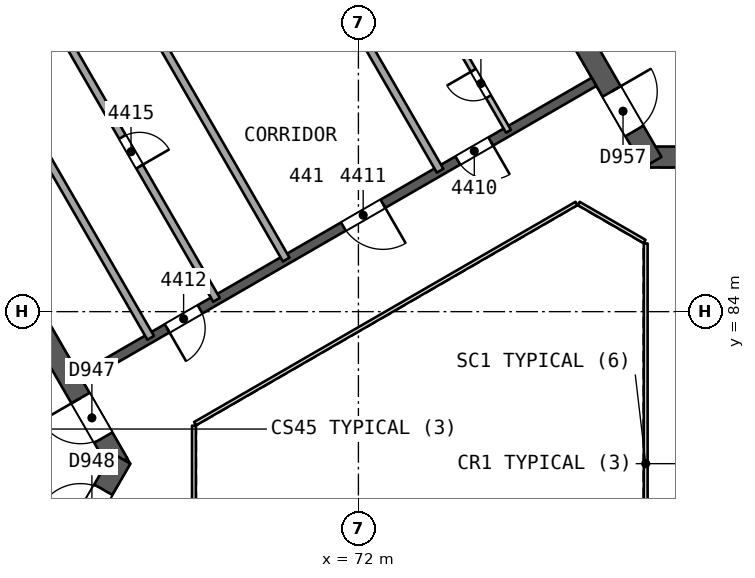
"""IFC4 building model, lengths in metres.
Left out: names, types, materials, properties, quantities, classifications, styles, units other than length and angle.
Written with IfcOpenShell. Run it as: python <this file> out.ifc"""

import sys

from ifc_helpers import new_model, si_unit, direction, frame, frame_2d, origin, place, context, subcontext, project, spatial, rectangle, extrude, element, fill, save


model = new_model("IFC4")
c1 = context("Model", 3, precision=1e-05, world=origin(), true_north=direction((0.0, 1.0)))
c2 = subcontext(c1, "Body", "Model", "MODEL_VIEW")
j1 = project(units=[si_unit("LENGTHUNIT", "METRE"), si_unit("PLANEANGLEUNIT", "RADIAN")], contexts=[c1])
p1 = place(None, origin())
s1 = spatial("IfcSite", under=j1, at=p1, CompositionType="ELEMENT")
p2 = place(p1, origin())
s2 = spatial("IfcBuilding", under=s1, at=p2, CompositionType="ELEMENT")
p3 = place(p2, frame((0.0, 0.0, 182.2)))
s3 = spatial("IfcBuildingStorey", under=s2, at=p3, CompositionType="ELEMENT", Elevation=182.2)
p4 = place(p3, frame((65.682, 80.0, 0.0), z_axis=(0.0, 0.0, 1.0), x_axis=(-0.500000202252, 0.866025287014, 0.0)))
e1 = element("IfcWall", 1, at=p4, inside=s3, PredefinedType="SHEAR", context=c2, shape_type="SweptSolid", body=[
    extrude(rectangle(XDim=10.221, YDim=0.55, at=frame_2d((5.111, 0.0))), origin(), (0.0, 0.0, 1.0), 3.7),
])
p5 = place(p4, frame((0.791, 0.0, 0.0)))
e2 = element("IfcOpeningElement", 2, at=p5, cuts=e1, PredefinedType="OPENING", context=c2, shape_type="SweptSolid", body=[
    extrude(rectangle(XDim=1.2, YDim=2.1, at=frame_2d((0.6, 1.05))), frame((0.0, 0.286, 0.0), z_axis=(0.0, -1.0, 0.0), x_axis=(1.0, 0.0, 0.0)), (0.0, 0.0, 1.0), 0.571),
])
p6 = place(p3, frame((60.709, 71.386, 0.0), z_axis=(0.0, 0.0, 1.0), x_axis=(0.500015938302, 0.866016201606, 0.0)))
e3 = element("IfcWall", 3, at=p6, inside=s3, PredefinedType="SHEAR", context=c2, shape_type="SweptSolid", body=[
    extrude(rectangle(XDim=10.105, YDim=0.55, at=frame_2d((5.053, 0.0))), origin(), (0.0, 0.0, 1.0), 3.7),
])
p7 = place(p6, frame((7.955, 0.0, 0.0)))
e4 = element("IfcOpeningElement", 4, at=p7, cuts=e3, PredefinedType="OPENING", context=c2, shape_type="SweptSolid", body=[
    extrude(rectangle(XDim=1.2, YDim=2.1, at=frame_2d((0.6, 1.05))), frame((0.0, 0.286, 0.0), z_axis=(0.0, -1.0, 0.0), x_axis=(1.0, 0.0, 0.0)), (0.0, 0.0, 1.0), 0.571),
])
p8 = place(p3, frame((79.659, 88.069, 0.0), z_axis=(0.0, 0.0, 1.0), x_axis=(1.0, 0.0, 0.0)))
e5 = element("IfcWall", 5, at=p8, inside=s3, PredefinedType="SHEAR", context=c2, shape_type="SweptSolid", body=[
    extrude(rectangle(XDim=10.221, YDim=0.55, at=frame_2d((5.111, 0.0))), origin(), (0.0, 0.0, 1.0), 3.7),
])
p9 = place(p8, frame((0.791, 0.0, 0.0)))
e6 = element("IfcOpeningElement", 6, at=p9, cuts=e5, PredefinedType="OPENING", context=c2, shape_type="SweptSolid", body=[
    extrude(rectangle(XDim=1.2, YDim=2.1, at=frame_2d((0.6, 1.05))), frame((0.0, 0.286, 0.0), z_axis=(0.0, -1.0, 0.0), x_axis=(1.0, 0.0, 0.0)), (0.0, 0.0, 1.0), 0.571),
])
p10 = place(p3, frame((74.686, 96.683, 0.0), z_axis=(0.0, 0.0, 1.0), x_axis=(0.499997818338, -0.866026663364, 0.0)))
e7 = element("IfcWall", 7, at=p10, inside=s3, PredefinedType="SHEAR", context=c2, shape_type="SweptSolid", body=[
    extrude(rectangle(XDim=10.105, YDim=0.55, at=frame_2d((5.052, 0.0))), origin(), (0.0, 0.0, 1.0), 3.7),
])
p11 = place(p10, frame((7.955, 0.0, 0.0)))
e8 = element("IfcOpeningElement", 8, at=p11, cuts=e7, PredefinedType="OPENING", context=c2, shape_type="SweptSolid", body=[
    extrude(rectangle(XDim=1.2, YDim=2.1, at=frame_2d((0.6, 1.05))), frame((0.0, 0.286, 0.0), z_axis=(0.0, -1.0, 0.0), x_axis=(1.0, 0.0, 0.0)), (0.0, 0.0, 1.0), 0.571),
])
p12 = place(p3, frame((78.2, 90.046, 0.0), z_axis=(0.0, 0.0, 1.0), x_axis=(-0.866026492143, -0.499998114903, 0.0)))
e9 = element("IfcWall", 9, at=p12, inside=s3, PredefinedType="SHEAR", context=c2, shape_type="SweptSolid", body=[
    extrude(rectangle(XDim=15.588, YDim=0.25, at=frame_2d((7.794, 0.0))), origin(), (0.0, 0.0, 1.0), 3.25),
])
p13 = place(p12, frame((3.138, 0.0, 0.0)))
e10 = element("IfcOpeningElement", 10, at=p13, cuts=e9, PredefinedType="OPENING", context=c2, shape_type="SweptSolid", body=[
    extrude(rectangle(XDim=1.0, YDim=2.1, at=frame_2d((0.5, 1.05))), frame((0.0, 0.135, 0.0), z_axis=(0.0, -1.0, 0.0), x_axis=(1.0, 0.0, 0.0)), (0.0, 0.0, 1.0), 0.271),
])
p14 = place(p12, frame((6.415, 0.0, 0.0)))
e11 = element("IfcOpeningElement", 11, at=p14, cuts=e9, PredefinedType="OPENING", context=c2, shape_type="SweptSolid", body=[
    extrude(rectangle(XDim=1.2, YDim=2.4, at=frame_2d((0.6, 1.2))), frame((0.0, 0.135, 0.0), z_axis=(0.0, -1.0, 0.0), x_axis=(1.0, 0.0, 0.0)), (0.0, 0.0, 1.0), 0.271),
])
p15 = place(p12, frame((11.971, 0.0, 0.0)))
e12 = element("IfcOpeningElement", 12, at=p15, cuts=e9, PredefinedType="OPENING", context=c2, shape_type="SweptSolid", body=[
    extrude(rectangle(XDim=1.0, YDim=2.1, at=frame_2d((0.5, 1.05))), frame((0.0, 0.135, 0.0), z_axis=(0.0, -1.0, 0.0), x_axis=(1.0, 0.0, 0.0)), (0.0, 0.0, 1.0), 0.271),
])
p16 = place(p3, frame((75.948, 88.746, 0.0), z_axis=(0.0, 0.0, 1.0), x_axis=(-0.499987231761, 0.866032775405, 0.0)))
e13 = element("IfcWall", 13, at=p16, inside=s3, PredefinedType="PARTITIONING", context=c2, shape_type="SweptSolid", body=[
    extrude(rectangle(XDim=2.9, YDim=0.15, at=frame_2d((1.45, 0.0))), origin(), (0.0, 0.0, 1.0), 3.25),
])
p17 = place(p16, frame((1.05, 0.0, 0.0)))
e14 = element("IfcOpeningElement", 14, at=p17, cuts=e13, PredefinedType="OPENING", context=c2, shape_type="SweptSolid", body=[
    extrude(rectangle(XDim=0.8, YDim=2.1, at=frame_2d((0.4, 1.05))), frame((0.0, 0.085, 0.0), z_axis=(0.0, -1.0, 0.0), x_axis=(1.0, 0.0, 0.0)), (0.0, 0.0, 1.0), 0.171),
])
for number, where, z_axis, x_axis in (
    (15, (68.561, 97.388, 0.0), (0.0, 0.0, 1.0), (0.5, -0.866, 0.0)),
    (16, (64.511, 95.05, 0.0), (0.0, 0.0, 1.0), (0.5, -0.866, 0.0)),
):
    element("IfcWall", number, at=place(p3, frame(where, z_axis=z_axis, x_axis=x_axis)), inside=s3, PredefinedType="PARTITIONING", context=c2, shape_type="SweptSolid", body=[
        extrude(rectangle(XDim=11.178, YDim=0.2, at=frame_2d((5.589, 0.0))), origin(), (0.0, 0.0, 1.0), 3.25),
    ])
p18 = place(p3, frame((66.534, 83.311, 0.0), z_axis=(0.0, 0.0, 1.0), x_axis=(-0.5000018851, 0.866024315419, 0.0)))
e17 = element("IfcWall", 17, at=p18, inside=s3, PredefinedType="PARTITIONING", context=c2, shape_type="SweptSolid", body=[
    extrude(rectangle(XDim=9.0, YDim=0.2, at=frame_2d((4.5, 0.0))), origin(), (0.0, 0.0, 1.0), 3.25),
])
p19 = place(p3, frame((63.766, 92.105, 0.0), z_axis=(0.0, 0.0, 1.0), x_axis=(0.5000018851, -0.866024315419, 0.0)))
e18 = element("IfcWall", 18, at=p19, inside=s3, PredefinedType="PARTITIONING", context=c2, shape_type="SweptSolid", body=[
    extrude(rectangle(XDim=9.0, YDim=0.2, at=frame_2d((4.5, 0.0))), origin(), (0.0, 0.0, 1.0), 3.25),
])
p20 = place(p19, frame((4.05, 0.0, 0.0)))
e19 = element("IfcOpeningElement", 19, at=p20, cuts=e18, PredefinedType="OPENING", context=c2, shape_type="SweptSolid", body=[
    extrude(rectangle(XDim=0.9, YDim=2.1, at=frame_2d((0.45, 1.05))), frame((0.0, 0.11, 0.0), z_axis=(0.0, -1.0, 0.0), x_axis=(1.0, 0.0, 0.0)), (0.0, 0.0, 1.0), 0.221),
])
p21 = place(p3, frame((42.841, 82.711, 0.0), z_axis=(0.0, 0.0, 1.0), x_axis=(0.866024774967, 0.500001089142, 0.0)))
e20 = element("IfcWall", 20, at=p21, inside=s3, PredefinedType="SOLIDWALL", context=c2, shape_type="SweptSolid", body=[
    extrude(rectangle(XDim=52.991, YDim=0.3, at=frame_2d((26.496, 0.0))), origin(), (0.0, 0.0, 1.0), 3.25),
])
p22 = place(p21, frame((20.619, 0.0, 0.0)))
e21 = element("IfcOpeningElement", 21, at=p22, cuts=e20, PredefinedType="OPENING", context=c2, shape_type="SweptSolid", body=[
    extrude(rectangle(XDim=2.4, YDim=2.4, at=frame_2d((1.2, 1.2))), frame((0.0, 0.161, 0.0), z_axis=(0.0, -1.0, 0.0), x_axis=(1.0, 0.0, 0.0)), (0.0, 0.0, 1.0), 0.321),
])
p23 = place(p21, frame((9.392, 0.0, 0.0)))
e22 = element("IfcOpeningElement", 22, at=p23, cuts=e20, PredefinedType="OPENING", context=c2, shape_type="SweptSolid", body=[
    extrude(rectangle(XDim=2.4, YDim=2.4, at=frame_2d((1.2, 1.2))), frame((0.0, 0.161, 0.0), z_axis=(0.0, -1.0, 0.0), x_axis=(1.0, 0.0, 0.0)), (0.0, 0.0, 1.0), 0.321),
])
p24 = place(p21, frame((40.145, 0.0, 0.0)))
e23 = element("IfcOpeningElement", 23, at=p24, cuts=e20, PredefinedType="OPENING", context=c2, shape_type="SweptSolid", body=[
    extrude(rectangle(XDim=2.4, YDim=2.4, at=frame_2d((1.2, 1.2))), frame((0.0, 0.161, 0.0), z_axis=(0.0, -1.0, 0.0), x_axis=(1.0, 0.0, 0.0)), (0.0, 0.0, 1.0), 0.321),
])
p25 = place(p21, frame((26.375, 0.0, 0.9)))
e24 = element("IfcOpeningElement", 24, at=p25, cuts=e20, PredefinedType="OPENING", context=c2, shape_type="SweptSolid", body=[
    extrude(rectangle(XDim=1.8, YDim=1.5, at=frame_2d((0.9, 0.75))), frame((0.0, 0.161, 0.0), z_axis=(0.0, -1.0, 0.0), x_axis=(1.0, 0.0, 0.0)), (0.0, 0.0, 1.0), 0.321),
])
p26 = place(p3, frame((86.77, 89.486, 0.0), z_axis=(0.0, 0.0, 1.0), x_axis=(-0.86601811187, 0.500012629753, 0.0)))
e25 = element("IfcWall", 25, at=p26, inside=s3, PredefinedType="SOLIDWALL", context=c2, shape_type="SweptSolid", body=[
    extrude(rectangle(XDim=10.9, YDim=0.2, at=frame_2d((5.45, 0.0))), origin(), (0.0, 0.0, 1.0), 3.25),
])
p27 = place(p26, frame((0.575, 0.0, 0.0)))
e26 = element("IfcOpeningElement", 26, at=p27, cuts=e25, PredefinedType="OPENING", context=c2, shape_type="SweptSolid", body=[
    extrude(rectangle(XDim=1.1, YDim=2.1, at=frame_2d((0.55, 1.05))), frame((0.0, 0.11, 0.0), z_axis=(0.0, -1.0, 0.0), x_axis=(1.0, 0.0, 0.0)), (0.0, 0.0, 1.0), 0.221),
])
p28 = place(p26, frame((2.825, 0.0, 0.0)))
e27 = element("IfcOpeningElement", 27, at=p28, cuts=e25, PredefinedType="OPENING", context=c2, shape_type="SweptSolid", body=[
    extrude(rectangle(XDim=1.1, YDim=2.1, at=frame_2d((0.55, 1.05))), frame((0.0, 0.11, 0.0), z_axis=(0.0, -1.0, 0.0), x_axis=(1.0, 0.0, 0.0)), (0.0, 0.0, 1.0), 0.221),
])
p29 = place(p26, frame((5.075, 0.0, 0.0)))
e28 = element("IfcOpeningElement", 28, at=p29, cuts=e25, PredefinedType="OPENING", context=c2, shape_type="SweptSolid", body=[
    extrude(rectangle(XDim=1.1, YDim=2.1, at=frame_2d((0.55, 1.05))), frame((0.0, 0.11, 0.0), z_axis=(0.0, -1.0, 0.0), x_axis=(1.0, 0.0, 0.0)), (0.0, 0.0, 1.0), 0.221),
])
p30 = place(p26, frame((7.325, 0.0, 0.0)))
e29 = element("IfcOpeningElement", 29, at=p30, cuts=e25, PredefinedType="OPENING", context=c2, shape_type="SweptSolid", body=[
    extrude(rectangle(XDim=1.1, YDim=2.1, at=frame_2d((0.55, 1.05))), frame((0.0, 0.11, 0.0), z_axis=(0.0, -1.0, 0.0), x_axis=(1.0, 0.0, 0.0)), (0.0, 0.0, 1.0), 0.221),
])
p31 = place(p3, frame((89.33, 90.872, 0.0), z_axis=(0.0, 0.0, 1.0), x_axis=(-0.866027589512, 0.49999621419, 0.0)))
e30 = element("IfcWall", 30, at=p31, inside=s3, PredefinedType="SOLIDWALL", context=c2, shape_type="SweptSolid", body=[
    extrude(rectangle(XDim=10.524, YDim=0.2, at=frame_2d((5.262, 0.0))), origin(), (0.0, 0.0, 1.0), 3.25),
])
p32 = place(p31, frame((0.312, 0.0, 0.0)))
e31 = element("IfcOpeningElement", 31, at=p32, cuts=e30, PredefinedType="OPENING", context=c2, shape_type="SweptSolid", body=[
    extrude(rectangle(XDim=0.9, YDim=2.1, at=frame_2d((0.45, 1.05))), frame((0.0, 0.11, 0.0), z_axis=(0.0, -1.0, 0.0), x_axis=(1.0, 0.0, 0.0)), (0.0, 0.0, 1.0), 0.221),
])
p33 = place(p3, frame((79.56, 74.206, 0.0), z_axis=(0.0, 0.0, 1.0), x_axis=(0.0, 1.0, 0.0)))
e32 = element("IfcWall", 32, at=p33, inside=s3, PredefinedType="PARTITIONING", context=c2, shape_type="SweptSolid", body=[
    extrude(rectangle(XDim=11.588, YDim=0.1, at=frame_2d((5.794, 0.0))), origin(), (0.0, 0.0, 1.0), 3.25),
])
p34 = place(p3, frame((79.53, 85.846, 0.0), z_axis=(0.0, 0.0, 1.0), x_axis=(-0.866041268327, 0.499972520799, 0.0)))
e33 = element("IfcWall", 33, at=p34, inside=s3, PredefinedType="PARTITIONING", context=c2, shape_type="SweptSolid", body=[
    extrude(rectangle(XDim=2.0, YDim=0.1, at=frame_2d((1.0, 0.0))), origin(), (0.0, 0.0, 1.0), 3.25),
])
p35 = place(p3, frame((77.738, 86.846, 0.0), z_axis=(0.0, 0.0, 1.0), x_axis=(-0.866026658274, -0.499997827154, 0.0)))
e34 = element("IfcWall", 34, at=p35, inside=s3, PredefinedType="PARTITIONING", context=c2, shape_type="SweptSolid", body=[
    extrude(rectangle(XDim=11.588, YDim=0.1, at=frame_2d((5.794, 0.0))), origin(), (0.0, 0.0, 1.0), 3.25),
])
p36 = place(p3, frame((67.672, 81.0, 0.0), z_axis=(0.0, 0.0, 1.0), x_axis=(0.0, -1.0, 0.0)))
e35 = element("IfcWall", 35, at=p36, inside=s3, PredefinedType="PARTITIONING", context=c2, shape_type="SweptSolid", body=[
    extrude(rectangle(XDim=2.0, YDim=0.1, at=frame_2d((1.0, 0.0))), origin(), (0.0, 0.0, 1.0), 3.25),
])
p37 = place(p17, origin())
e36 = element("IfcDoor", 36, at=p37, inside=s3, OperationType="SINGLE_SWING_RIGHT", PredefinedType="NOTDEFINED", context=c2, shape_type="SweptSolid", body=[
    extrude(rectangle(XDim=0.8, YDim=2.1, at=frame_2d((0.4, 1.05))), frame((0.0, 0.025, 0.0), z_axis=(0.0, -1.0, 0.0), x_axis=(1.0, 0.0, 0.0)), (0.0, 0.0, 1.0), 0.05),
])
fill(e14, e36)
p38 = place(p13, origin())
e37 = element("IfcDoor", 37, at=p38, inside=s3, OperationType="SINGLE_SWING_LEFT", PredefinedType="NOTDEFINED", context=c2, shape_type="SweptSolid", body=[
    extrude(rectangle(XDim=1.0, YDim=2.1, at=frame_2d((0.5, 1.05))), frame((0.0, 0.025, 0.0), z_axis=(0.0, -1.0, 0.0), x_axis=(1.0, 0.0, 0.0)), (0.0, 0.0, 1.0), 0.05),
])
fill(e10, e37)
p39 = place(p14, origin())
e38 = element("IfcDoor", 38, at=p39, inside=s3, OperationType="SINGLE_SWING_LEFT", PredefinedType="NOTDEFINED", context=c2, shape_type="SweptSolid", body=[
    extrude(rectangle(XDim=1.2, YDim=2.4, at=frame_2d((0.6, 1.2))), frame((0.0, 0.025, 0.0), z_axis=(0.0, -1.0, 0.0), x_axis=(1.0, 0.0, 0.0)), (0.0, 0.0, 1.0), 0.05),
])
fill(e11, e38)
p40 = place(p15, origin())
e39 = element("IfcDoor", 39, at=p40, inside=s3, OperationType="SINGLE_SWING_RIGHT", PredefinedType="NOTDEFINED", context=c2, shape_type="SweptSolid", body=[
    extrude(rectangle(XDim=1.0, YDim=2.1, at=frame_2d((0.5, 1.05))), frame((0.0, 0.025, 0.0), z_axis=(0.0, -1.0, 0.0), x_axis=(1.0, 0.0, 0.0)), (0.0, 0.0, 1.0), 0.05),
])
fill(e12, e39)
p41 = place(p20, origin())
e40 = element("IfcDoor", 40, at=p41, inside=s3, OperationType="SINGLE_SWING_RIGHT", PredefinedType="NOTDEFINED", context=c2, shape_type="SweptSolid", body=[
    extrude(rectangle(XDim=0.9, YDim=2.1, at=frame_2d((0.45, 1.05))), frame((0.0, 0.025, 0.0), z_axis=(0.0, -1.0, 0.0), x_axis=(1.0, 0.0, 0.0)), (0.0, 0.0, 1.0), 0.05),
])
fill(e19, e40)
p42 = place(p5, origin())
e41 = element("IfcDoor", 41, at=p42, inside=s3, OperationType="SINGLE_SWING_RIGHT", PredefinedType="NOTDEFINED", context=c2, shape_type="SweptSolid", body=[
    extrude(rectangle(XDim=1.2, YDim=2.1, at=frame_2d((0.6, 1.05))), frame((0.0, 0.025, 0.0), z_axis=(0.0, -1.0, 0.0), x_axis=(1.0, 0.0, 0.0)), (0.0, 0.0, 1.0), 0.05),
])
fill(e2, e41)
p43 = place(p7, origin())
e42 = element("IfcDoor", 42, at=p43, inside=s3, OperationType="SINGLE_SWING_LEFT", PredefinedType="NOTDEFINED", context=c2, shape_type="SweptSolid", body=[
    extrude(rectangle(XDim=1.2, YDim=2.1, at=frame_2d((0.6, 1.05))), frame((0.0, 0.025, 0.0), z_axis=(0.0, -1.0, 0.0), x_axis=(1.0, 0.0, 0.0)), (0.0, 0.0, 1.0), 0.05),
])
fill(e4, e42)
p44 = place(p11, origin())
e43 = element("IfcDoor", 43, at=p44, inside=s3, OperationType="SINGLE_SWING_LEFT", PredefinedType="NOTDEFINED", context=c2, shape_type="SweptSolid", body=[
    extrude(rectangle(XDim=1.2, YDim=2.1, at=frame_2d((0.6, 1.05))), frame((0.0, 0.025, 0.0), z_axis=(0.0, -1.0, 0.0), x_axis=(1.0, 0.0, 0.0)), (0.0, 0.0, 1.0), 0.05),
])
fill(e8, e43)
save(model, sys.argv[1])
